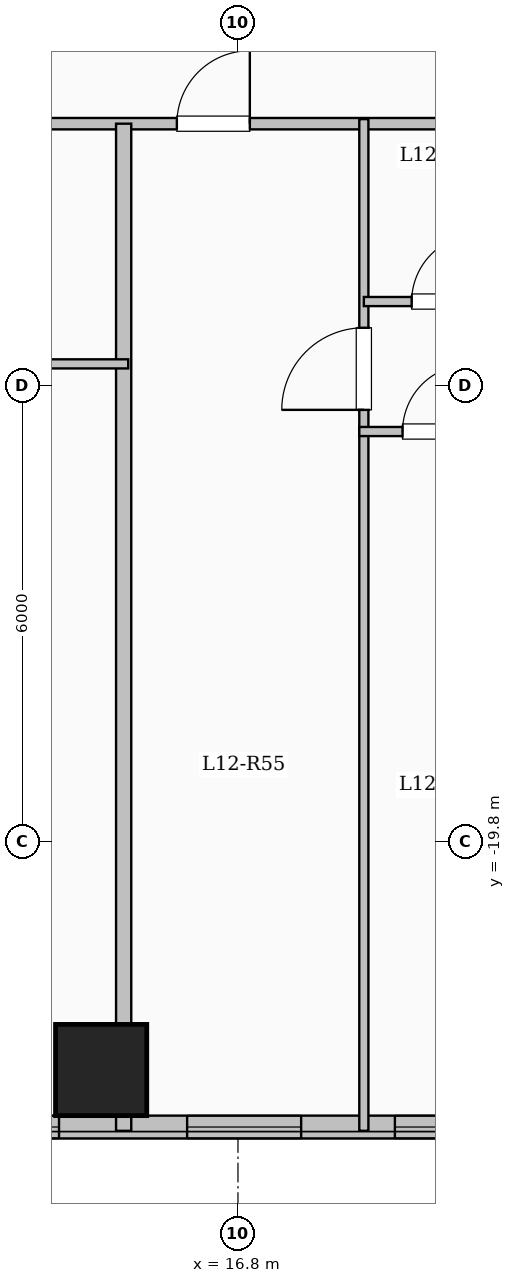
"""IFC4 building model, lengths in metres.
Left out: names, types, materials, properties, quantities, classifications, styles, units other than length and angle.
Written with IfcOpenShell. Run it as: python <this file> out.ifc"""

import sys

from ifc_helpers import new_model, si_unit, direction, frame, frame_2d, origin, origin_2d, place, context, subcontext, project, spatial, rectangle, extrude, element, fill, save


model = new_model("IFC4")
c1 = context("Model", 3, precision=1e-05, world=origin(), true_north=direction((0.0, 1.0)))
c2 = subcontext(c1, "Body", "Model", "MODEL_VIEW")
j1 = project(units=[si_unit("LENGTHUNIT", "METRE"), si_unit("PLANEANGLEUNIT", "RADIAN")], contexts=[c1])
p1 = place(None, origin())
s1 = spatial("IfcSite", under=j1, at=p1, CompositionType="ELEMENT")
p2 = place(p1, origin())
s2 = spatial("IfcBuilding", under=s1, at=p2, CompositionType="ELEMENT")
p3 = place(p2, frame((0.0, 0.0, 47.45)))
s3 = spatial("IfcBuildingStorey", under=s2, at=p3, CompositionType="ELEMENT", Elevation=47.45)
p4 = place(p3, frame((15.0, -22.8, 0.0), z_axis=(0.0, 0.0, 1.0), x_axis=(1.0, 0.0, 0.0)))
e1 = element("IfcColumn", 1, at=p4, inside=s3, PredefinedType="COLUMN", context=c2, shape_type="SweptSolid", body=[
    extrude(rectangle(XDim=1.2, YDim=1.2, at=origin_2d()), origin(), (0.0, 0.0, 1.0), 3.35),
])
p5 = place(p3, frame((22.65, -23.55, 0.0), z_axis=(0.0, 0.0, 1.0), x_axis=(-1.0, 0.0, 0.0)))
e2 = element("IfcWall", 2, at=p5, inside=s3, PredefinedType="SOLIDWALL", context=c2, shape_type="SweptSolid", body=[
    extrude(rectangle(XDim=15.3, YDim=0.3, at=frame_2d((7.65, 0.0))), origin(), (0.0, 0.0, 1.0), 3.1),
])
p6 = place(p5, frame((0.509, 0.0, 0.95)))
e3 = element("IfcOpeningElement", 3, at=p6, cuts=e2, PredefinedType="OPENING", context=c2, shape_type="SweptSolid", body=[
    extrude(rectangle(XDim=1.2, YDim=1.5, at=frame_2d((0.6, 0.75))), frame((0.0, 0.16, 0.0), z_axis=(0.0, -1.0, 0.0), x_axis=(1.0, 0.0, 0.0)), (0.0, 0.0, 1.0), 0.32),
])
p7 = place(p5, frame((2.585, 0.0, 0.95)))
e4 = element("IfcOpeningElement", 4, at=p7, cuts=e2, PredefinedType="OPENING", context=c2, shape_type="SweptSolid", body=[
    extrude(rectangle(XDim=1.2, YDim=1.5, at=frame_2d((0.6, 0.75))), frame((0.0, 0.16, 0.0), z_axis=(0.0, -1.0, 0.0), x_axis=(1.0, 0.0, 0.0)), (0.0, 0.0, 1.0), 0.32),
])
p8 = place(p5, frame((5.019, 0.0, 0.9)))
e5 = element("IfcOpeningElement", 5, at=p8, cuts=e2, PredefinedType="OPENING", context=c2, shape_type="SweptSolid", body=[
    extrude(rectangle(XDim=1.5, YDim=1.65, at=frame_2d((0.75, 0.825))), frame((0.0, 0.16, 0.0), z_axis=(0.0, -1.0, 0.0), x_axis=(1.0, 0.0, 0.0)), (0.0, 0.0, 1.0), 0.32),
])
p9 = place(p5, frame((8.204, 0.0, 0.9)))
e6 = element("IfcOpeningElement", 6, at=p9, cuts=e2, PredefinedType="OPENING", context=c2, shape_type="SweptSolid", body=[
    extrude(rectangle(XDim=1.5, YDim=1.65, at=frame_2d((0.75, 0.825))), frame((0.0, 0.16, 0.0), z_axis=(0.0, -1.0, 0.0), x_axis=(1.0, 0.0, 0.0)), (0.0, 0.0, 1.0), 0.32),
])
p10 = place(p5, frame((11.415, 0.0, 0.9)))
e7 = element("IfcOpeningElement", 7, at=p10, cuts=e2, PredefinedType="OPENING", context=c2, shape_type="SweptSolid", body=[
    extrude(rectangle(XDim=1.8, YDim=1.65, at=frame_2d((0.9, 0.825))), frame((0.0, 0.16, 0.0), z_axis=(0.0, -1.0, 0.0), x_axis=(1.0, 0.0, 0.0)), (0.0, 0.0, 1.0), 0.32),
])
p11 = place(p5, frame((14.303, 0.0, 0.95)))
e8 = element("IfcOpeningElement", 8, at=p11, cuts=e2, PredefinedType="OPENING", context=c2, shape_type="SweptSolid", body=[
    extrude(rectangle(XDim=0.85, YDim=1.5, at=frame_2d((0.425, 0.75))), frame((0.0, 0.16, 0.0), z_axis=(0.0, -1.0, 0.0), x_axis=(1.0, 0.0, 0.0)), (0.0, 0.0, 1.0), 0.32),
])
p12 = place(p3, frame((8.55, -10.35, 0.0), z_axis=(0.0, 0.0, 1.0), x_axis=(1.0, 0.0, 0.0)))
e9 = element("IfcWall", 9, at=p12, inside=s3, PredefinedType="PARTITIONING", context=c2, shape_type="SweptSolid", body=[
    extrude(rectangle(XDim=14.0, YDim=0.15, at=frame_2d((7.0, 0.0))), origin(), (0.0, 0.0, 1.0), 3.1),
])
p13 = place(p12, frame((0.75, 0.0, 0.0)))
e10 = element("IfcOpeningElement", 10, at=p13, cuts=e9, PredefinedType="OPENING", context=c2, shape_type="SweptSolid", body=[
    extrude(rectangle(XDim=0.96, YDim=2.15, at=frame_2d((0.48, 1.075))), frame((0.0, 0.085, 0.0), z_axis=(0.0, -1.0, 0.0), x_axis=(1.0, 0.0, 0.0)), (0.0, 0.0, 1.0), 0.17),
])
p14 = place(p12, frame((7.446, 0.0, 0.0)))
e11 = element("IfcOpeningElement", 11, at=p14, cuts=e9, PredefinedType="OPENING", context=c2, shape_type="SweptSolid", body=[
    extrude(rectangle(XDim=0.96, YDim=2.15, at=frame_2d((0.48, 1.075))), frame((0.0, 0.085, 0.0), z_axis=(0.0, -1.0, 0.0), x_axis=(1.0, 0.0, 0.0)), (0.0, 0.0, 1.0), 0.17),
])
p15 = place(p3, frame((15.296, -23.6, 0.0), z_axis=(0.0, 0.0, 1.0), x_axis=(0.0, 1.0, 0.0)))
e12 = element("IfcWall", 12, at=p15, inside=s3, PredefinedType="SOLIDWALL", context=c2, shape_type="SweptSolid", body=[
    extrude(rectangle(XDim=13.25, YDim=0.2, at=frame_2d((6.625, 0.0))), origin(), (0.0, 0.0, 1.0), 2.435),
])
p16 = place(p3, frame((12.02, -13.51, 0.0), z_axis=(0.0, 0.0, 1.0), x_axis=(1.0, 0.0, 0.0)))
e13 = element("IfcWall", 13, at=p16, inside=s3, PredefinedType="PARTITIONING", context=c2, shape_type="SweptSolid", body=[
    extrude(rectangle(XDim=3.336, YDim=0.12, at=frame_2d((1.668, 0.0))), origin(), (0.0, 0.0, 1.0), 3.1),
])
p17 = place(p3, frame((18.456, -23.6, 0.0), z_axis=(0.0, 0.0, 1.0), x_axis=(0.0, 1.0, 0.0)))
e14 = element("IfcWall", 14, at=p17, inside=s3, PredefinedType="PARTITIONING", context=c2, shape_type="SweptSolid", body=[
    extrude(rectangle(XDim=13.31, YDim=0.12, at=frame_2d((6.655, 0.0))), origin(), (0.0, 0.0, 1.0), 3.1),
])
p18 = place(p17, frame((9.485, 0.0, 0.0)))
e15 = element("IfcOpeningElement", 15, at=p18, cuts=e14, PredefinedType="OPENING", context=c2, shape_type="SweptSolid", body=[
    extrude(rectangle(XDim=1.08, YDim=2.15, at=frame_2d((0.54, 1.075))), frame((0.0, 0.07, 0.0), z_axis=(0.0, -1.0, 0.0), x_axis=(1.0, 0.0, 0.0)), (0.0, 0.0, 1.0), 0.14),
])
p19 = place(p3, frame((18.456, -12.69, 0.0), z_axis=(0.0, 0.0, 1.0), x_axis=(1.0, 0.0, 0.0)))
e16 = element("IfcWall", 16, at=p19, inside=s3, PredefinedType="PARTITIONING", context=c2, shape_type="SweptSolid", body=[
    extrude(rectangle(XDim=2.138, YDim=0.12, at=frame_2d((1.069, 0.0))), origin(), (0.0, 0.0, 1.0), 3.1),
])
p20 = place(p19, frame((0.629, 0.0, 0.0)))
e17 = element("IfcOpeningElement", 17, at=p20, cuts=e16, PredefinedType="OPENING", context=c2, shape_type="SweptSolid", body=[
    extrude(rectangle(XDim=0.88, YDim=2.1, at=frame_2d((0.44, 1.05))), frame((0.0, 0.07, 0.0), z_axis=(0.0, -1.0, 0.0), x_axis=(1.0, 0.0, 0.0)), (0.0, 0.0, 1.0), 0.14),
])
p21 = place(p3, frame((18.396, -14.4, 0.0), z_axis=(0.0, 0.0, 1.0), x_axis=(1.0, 0.0, 0.0)))
e18 = element("IfcWall", 18, at=p21, inside=s3, PredefinedType="PARTITIONING", context=c2, shape_type="SweptSolid", body=[
    extrude(rectangle(XDim=4.214, YDim=0.12, at=frame_2d((2.107, 0.0))), origin(), (0.0, 0.0, 1.0), 3.1),
])
p22 = place(p21, frame((0.569, 0.0, 0.0)))
e19 = element("IfcOpeningElement", 19, at=p22, cuts=e18, PredefinedType="OPENING", context=c2, shape_type="SweptSolid", body=[
    extrude(rectangle(XDim=0.88, YDim=2.1, at=frame_2d((0.44, 1.05))), frame((0.0, 0.07, 0.0), z_axis=(0.0, -1.0, 0.0), x_axis=(1.0, 0.0, 0.0)), (0.0, 0.0, 1.0), 0.14),
])
p23 = place(p21, frame((2.586, 0.0, 0.0)))
e20 = element("IfcOpeningElement", 20, at=p23, cuts=e18, PredefinedType="OPENING", context=c2, shape_type="SweptSolid", body=[
    extrude(rectangle(XDim=0.88, YDim=2.1, at=frame_2d((0.44, 1.05))), frame((0.0, 0.07, 0.0), z_axis=(0.0, -1.0, 0.0), x_axis=(1.0, 0.0, 0.0)), (0.0, 0.0, 1.0), 0.14),
])
p24 = place(p7, origin())
e21 = element("IfcWindow", 21, at=p24, inside=s3, PartitioningType="SINGLE_PANEL", PredefinedType="WINDOW", context=c2, shape_type="SweptSolid", body=[
    extrude(rectangle(XDim=1.2, YDim=1.5, at=frame_2d((0.6, 0.75))), frame((0.0, 0.03, 0.0), z_axis=(0.0, -1.0, 0.0), x_axis=(1.0, 0.0, 0.0)), (0.0, 0.0, 1.0), 0.06),
])
fill(e4, e21)
p25 = place(p8, origin())
e22 = element("IfcWindow", 22, at=p25, inside=s3, PartitioningType="SINGLE_PANEL", PredefinedType="WINDOW", context=c2, shape_type="SweptSolid", body=[
    extrude(rectangle(XDim=1.5, YDim=1.65, at=frame_2d((0.75, 0.825))), frame((0.0, 0.03, 0.0), z_axis=(0.0, -1.0, 0.0), x_axis=(1.0, 0.0, 0.0)), (0.0, 0.0, 1.0), 0.06),
])
fill(e5, e22)
p26 = place(p9, origin())
e23 = element("IfcWindow", 23, at=p26, inside=s3, PartitioningType="SINGLE_PANEL", PredefinedType="WINDOW", context=c2, shape_type="SweptSolid", body=[
    extrude(rectangle(XDim=1.5, YDim=1.65, at=frame_2d((0.75, 0.825))), frame((0.0, 0.03, 0.0), z_axis=(0.0, -1.0, 0.0), x_axis=(1.0, 0.0, 0.0)), (0.0, 0.0, 1.0), 0.06),
])
fill(e6, e23)
p27 = place(p14, origin())
e24 = element("IfcDoor", 24, at=p27, inside=s3, OperationType="SINGLE_SWING_RIGHT", PredefinedType="DOOR", context=c2, shape_type="SweptSolid", body=[
    extrude(rectangle(XDim=0.96, YDim=2.15, at=frame_2d((0.48, 1.075))), frame((0.0, 0.025, 0.0), z_axis=(0.0, -1.0, 0.0), x_axis=(1.0, 0.0, 0.0)), (0.0, 0.0, 1.0), 0.05),
])
fill(e11, e24)
p28 = place(p18, origin())
e25 = element("IfcDoor", 25, at=p28, inside=s3, OperationType="SINGLE_SWING_LEFT", PredefinedType="DOOR", context=c2, shape_type="SweptSolid", body=[
    extrude(rectangle(XDim=1.08, YDim=2.15, at=frame_2d((0.54, 1.075))), frame((0.0, 0.025, 0.0), z_axis=(0.0, -1.0, 0.0), x_axis=(1.0, 0.0, 0.0)), (0.0, 0.0, 1.0), 0.05),
])
fill(e15, e25)
p29 = place(p20, origin())
e26 = element("IfcDoor", 26, at=p29, inside=s3, OperationType="SINGLE_SWING_RIGHT", PredefinedType="DOOR", context=c2, shape_type="SweptSolid", body=[
    extrude(rectangle(XDim=0.88, YDim=2.1, at=frame_2d((0.44, 1.05))), frame((0.0, 0.025, 0.0), z_axis=(0.0, -1.0, 0.0), x_axis=(1.0, 0.0, 0.0)), (0.0, 0.0, 1.0), 0.05),
])
fill(e17, e26)
p30 = place(p22, origin())
e27 = element("IfcDoor", 27, at=p30, inside=s3, OperationType="SINGLE_SWING_RIGHT", PredefinedType="DOOR", context=c2, shape_type="SweptSolid", body=[
    extrude(rectangle(XDim=0.88, YDim=2.1, at=frame_2d((0.44, 1.05))), frame((0.0, 0.025, 0.0), z_axis=(0.0, -1.0, 0.0), x_axis=(1.0, 0.0, 0.0)), (0.0, 0.0, 1.0), 0.05),
])
fill(e19, e27)
save(model, sys.argv[1])
